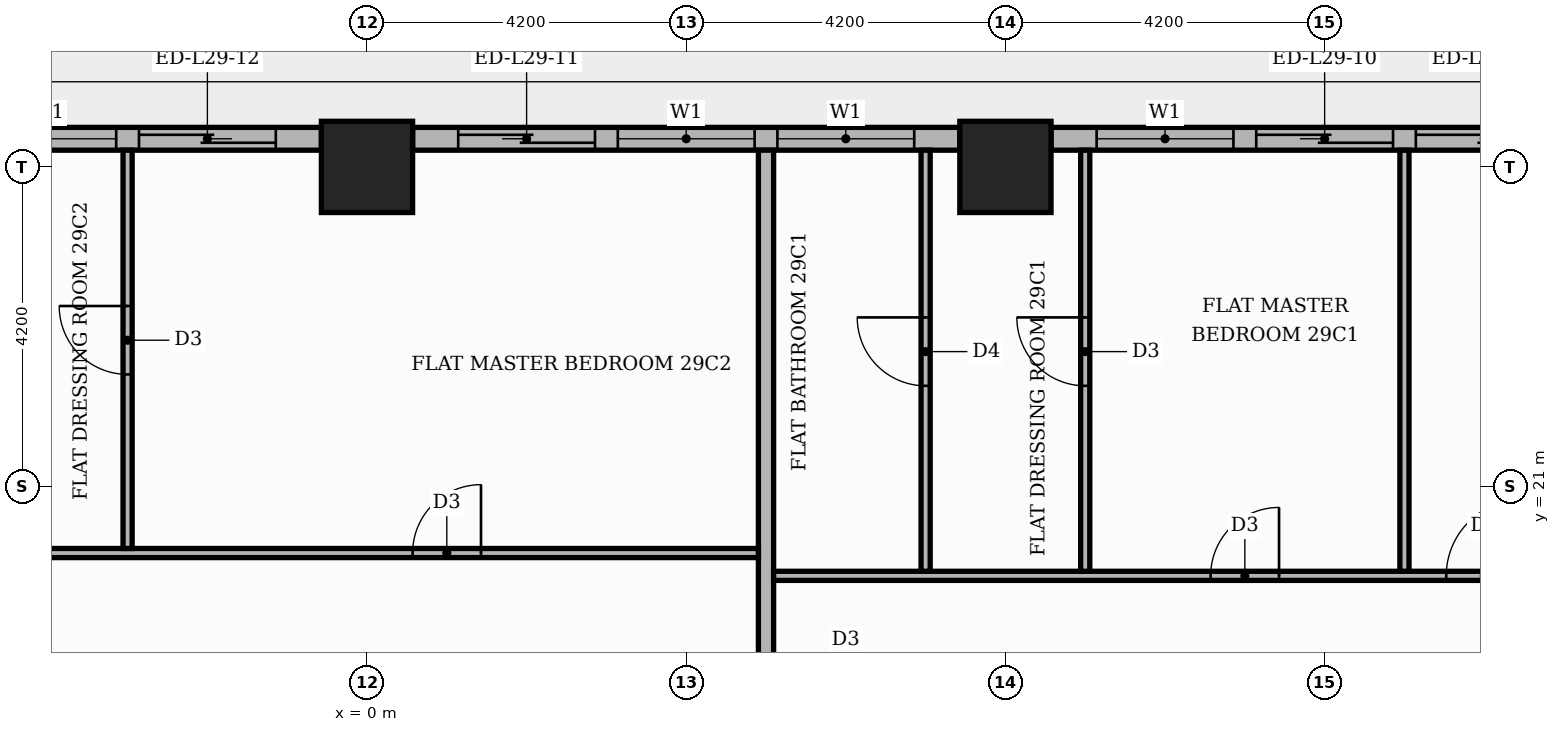
"""IFC4 building model, lengths in metres.
Left out: names, types, materials, properties, quantities, classifications, styles, units other than length and angle.
Written with IfcOpenShell. Run it as: python <this file> out.ifc"""

import sys

from ifc_helpers import new_model, si_unit, direction, frame, frame_2d, origin, origin_2d, place, context, subcontext, project, spatial, rectangle, extrude, element, fill, save


model = new_model("IFC4")
c1 = context("Model", 3, precision=1e-05, world=origin(), true_north=direction((0.0, 1.0)))
c2 = subcontext(c1, "Body", "Model", "MODEL_VIEW")
j1 = project(units=[si_unit("LENGTHUNIT", "METRE"), si_unit("PLANEANGLEUNIT", "RADIAN")], contexts=[c1])
p1 = place(None, origin())
s1 = spatial("IfcSite", under=j1, at=p1, CompositionType="ELEMENT")
p2 = place(p1, origin())
s2 = spatial("IfcBuilding", under=s1, at=p2, CompositionType="ELEMENT")
p3 = place(p2, frame((0.0, 0.0, 122.1)))
s3 = spatial("IfcBuildingStorey", under=s2, at=p3, CompositionType="ELEMENT", Elevation=122.1)
for number, where, z_axis, x_axis in (
    (1, (0.0, 25.2, 0.0), (0.0, 0.0, 1.0), (1.0, 0.0, 0.0)),
    (2, (8.4, 25.2, 0.0), (0.0, 0.0, 1.0), (1.0, 0.0, 0.0)),
):
    element("IfcColumn", number, at=place(p3, frame(where, z_axis=z_axis, x_axis=x_axis)), inside=s3, PredefinedType="COLUMN", context=c2, shape_type="SweptSolid", body=[
        extrude(rectangle(XDim=1.2, YDim=1.2, at=origin_2d()), origin(), (0.0, 0.0, 1.0), 3.9),
    ])
p4 = place(p3, frame((16.2, 25.57, 0.0), z_axis=(0.0, 0.0, 1.0), x_axis=(-1.0, 0.0, 0.0)))
e3 = element("IfcWall", 3, at=p4, inside=s3, PredefinedType="STANDARD", context=c2, shape_type="SweptSolid", body=[
    extrude(rectangle(XDim=7.2, YDim=0.3, at=frame_2d((3.6, 0.0))), origin(), (0.0, 0.0, 1.0), 3.4),
])
p5 = place(p4, frame((0.6, 0.0, 0.0)))
e4 = element("IfcOpeningElement", 4, at=p5, cuts=e3, PredefinedType="OPENING", context=c2, shape_type="SweptSolid", body=[
    extrude(rectangle(XDim=1.8, YDim=2.4, at=frame_2d((0.9, 1.2))), frame((0.0, 0.16, 0.0), z_axis=(0.0, -1.0, 0.0), x_axis=(1.0, 0.0, 0.0)), (0.0, 0.0, 1.0), 0.32),
])
p6 = place(p4, frame((2.7, 0.0, 0.0)))
e5 = element("IfcOpeningElement", 5, at=p6, cuts=e3, PredefinedType="OPENING", context=c2, shape_type="SweptSolid", body=[
    extrude(rectangle(XDim=1.8, YDim=2.4, at=frame_2d((0.9, 1.2))), frame((0.0, 0.16, 0.0), z_axis=(0.0, -1.0, 0.0), x_axis=(1.0, 0.0, 0.0)), (0.0, 0.0, 1.0), 0.32),
])
p7 = place(p4, frame((4.8, 0.0, 0.9)))
e6 = element("IfcOpeningElement", 6, at=p7, cuts=e3, PredefinedType="OPENING", context=c2, shape_type="SweptSolid", body=[
    extrude(rectangle(XDim=1.8, YDim=2.1, at=frame_2d((0.9, 1.05))), frame((0.0, 0.16, 0.0), z_axis=(0.0, -1.0, 0.0), x_axis=(1.0, 0.0, 0.0)), (0.0, 0.0, 1.0), 0.32),
])
p8 = place(p3, frame((7.8, 25.57, 0.0), z_axis=(0.0, 0.0, 1.0), x_axis=(-1.0, 0.0, 0.0)))
e7 = element("IfcWall", 7, at=p8, inside=s3, PredefinedType="STANDARD", context=c2, shape_type="SweptSolid", body=[
    extrude(rectangle(XDim=7.2, YDim=0.3, at=frame_2d((3.6, 0.0))), origin(), (0.0, 0.0, 1.0), 3.4),
])
p9 = place(p8, frame((0.6, 0.0, 0.9)))
e8 = element("IfcOpeningElement", 8, at=p9, cuts=e7, PredefinedType="OPENING", context=c2, shape_type="SweptSolid", body=[
    extrude(rectangle(XDim=1.8, YDim=2.1, at=frame_2d((0.9, 1.05))), frame((0.0, 0.16, 0.0), z_axis=(0.0, -1.0, 0.0), x_axis=(1.0, 0.0, 0.0)), (0.0, 0.0, 1.0), 0.32),
])
p10 = place(p8, frame((2.7, 0.0, 0.9)))
e9 = element("IfcOpeningElement", 9, at=p10, cuts=e7, PredefinedType="OPENING", context=c2, shape_type="SweptSolid", body=[
    extrude(rectangle(XDim=1.8, YDim=2.1, at=frame_2d((0.9, 1.05))), frame((0.0, 0.16, 0.0), z_axis=(0.0, -1.0, 0.0), x_axis=(1.0, 0.0, 0.0)), (0.0, 0.0, 1.0), 0.32),
])
p11 = place(p8, frame((4.8, 0.0, 0.0)))
e10 = element("IfcOpeningElement", 10, at=p11, cuts=e7, PredefinedType="OPENING", context=c2, shape_type="SweptSolid", body=[
    extrude(rectangle(XDim=1.8, YDim=2.4, at=frame_2d((0.9, 1.2))), frame((0.0, 0.16, 0.0), z_axis=(0.0, -1.0, 0.0), x_axis=(1.0, 0.0, 0.0)), (0.0, 0.0, 1.0), 0.32),
])
p12 = place(p3, frame((-0.6, 25.57, 0.0), z_axis=(0.0, 0.0, 1.0), x_axis=(-1.0, 0.0, 0.0)))
e11 = element("IfcWall", 11, at=p12, inside=s3, PredefinedType="STANDARD", context=c2, shape_type="SweptSolid", body=[
    extrude(rectangle(XDim=7.2, YDim=0.3, at=frame_2d((3.6, 0.0))), origin(), (0.0, 0.0, 1.0), 3.4),
])
p13 = place(p12, frame((0.6, 0.0, 0.0)))
e12 = element("IfcOpeningElement", 12, at=p13, cuts=e11, PredefinedType="OPENING", context=c2, shape_type="SweptSolid", body=[
    extrude(rectangle(XDim=1.8, YDim=2.4, at=frame_2d((0.9, 1.2))), frame((0.0, 0.16, 0.0), z_axis=(0.0, -1.0, 0.0), x_axis=(1.0, 0.0, 0.0)), (0.0, 0.0, 1.0), 0.32),
])
p14 = place(p12, frame((2.7, 0.0, 0.9)))
e13 = element("IfcOpeningElement", 13, at=p14, cuts=e11, PredefinedType="OPENING", context=c2, shape_type="SweptSolid", body=[
    extrude(rectangle(XDim=1.8, YDim=2.1, at=frame_2d((0.9, 1.05))), frame((0.0, 0.16, 0.0), z_axis=(0.0, -1.0, 0.0), x_axis=(1.0, 0.0, 0.0)), (0.0, 0.0, 1.0), 0.32),
])
p15 = place(p12, frame((4.8, 0.0, 0.9)))
e14 = element("IfcOpeningElement", 14, at=p15, cuts=e11, PredefinedType="OPENING", context=c2, shape_type="SweptSolid", body=[
    extrude(rectangle(XDim=1.8, YDim=2.1, at=frame_2d((0.9, 1.05))), frame((0.0, 0.16, 0.0), z_axis=(0.0, -1.0, 0.0), x_axis=(1.0, 0.0, 0.0)), (0.0, 0.0, 1.0), 0.32),
])
p16 = place(p3, frame((5.25, 13.75, 0.0), z_axis=(0.0, 0.0, 1.0), x_axis=(0.0, 1.0, 0.0)))
e15 = element("IfcWall", 15, at=p16, inside=s3, PredefinedType="PARTITIONING", context=c2, shape_type="SweptSolid", body=[
    extrude(rectangle(XDim=11.67, YDim=0.2, at=frame_2d((5.835, 0.0))), origin(), (0.0, 0.0, 1.0), 3.4),
])
p17 = place(p3, frame((5.35, 19.82, 0.0), z_axis=(0.0, 0.0, 1.0), x_axis=(1.0, 0.0, 0.0)))
e16 = element("IfcWall", 16, at=p17, inside=s3, PredefinedType="PARTITIONING", context=c2, shape_type="SweptSolid", body=[
    extrude(rectangle(XDim=12.05, YDim=0.12, at=frame_2d((6.025, 0.0))), origin(), (0.0, 0.0, 1.0), 3.4),
])
p18 = place(p17, frame((8.85, 0.0, 0.0)))
e17 = element("IfcOpeningElement", 17, at=p18, cuts=e16, PredefinedType="OPENING", context=c2, shape_type="SweptSolid", body=[
    extrude(rectangle(XDim=1.0, YDim=2.1, at=frame_2d((0.5, 1.05))), frame((0.0, 0.07, 0.0), z_axis=(0.0, -1.0, 0.0), x_axis=(1.0, 0.0, 0.0)), (0.0, 0.0, 1.0), 0.14),
])
p19 = place(p17, frame((5.75, 0.0, 0.0)))
e18 = element("IfcOpeningElement", 18, at=p19, cuts=e16, PredefinedType="OPENING", context=c2, shape_type="SweptSolid", body=[
    extrude(rectangle(XDim=0.9, YDim=2.1, at=frame_2d((0.45, 1.05))), frame((0.0, 0.07, 0.0), z_axis=(0.0, -1.0, 0.0), x_axis=(1.0, 0.0, 0.0)), (0.0, 0.0, 1.0), 0.14),
])
p20 = place(p3, frame((7.35, 19.88, 0.0), z_axis=(0.0, 0.0, 1.0), x_axis=(0.0, 1.0, 0.0)))
e19 = element("IfcWall", 19, at=p20, inside=s3, PredefinedType="PARTITIONING", context=c2, shape_type="SweptSolid", body=[
    extrude(rectangle(XDim=5.54, YDim=0.12, at=frame_2d((2.77, 0.0))), origin(), (0.0, 0.0, 1.0), 3.4),
])
p21 = place(p20, frame((2.44, 0.0, 0.0)))
e20 = element("IfcOpeningElement", 20, at=p21, cuts=e19, PredefinedType="OPENING", context=c2, shape_type="SweptSolid", body=[
    extrude(rectangle(XDim=0.9, YDim=2.1, at=frame_2d((0.45, 1.05))), frame((0.0, 0.07, 0.0), z_axis=(0.0, -1.0, 0.0), x_axis=(1.0, 0.0, 0.0)), (0.0, 0.0, 1.0), 0.14),
])
p22 = place(p3, frame((9.45, 19.88, 0.0), z_axis=(0.0, 0.0, 1.0), x_axis=(0.0, 1.0, 0.0)))
e21 = element("IfcWall", 21, at=p22, inside=s3, PredefinedType="PARTITIONING", context=c2, shape_type="SweptSolid", body=[
    extrude(rectangle(XDim=5.54, YDim=0.12, at=frame_2d((2.77, 0.0))), origin(), (0.0, 0.0, 1.0), 3.4),
])
p23 = place(p22, frame((2.44, 0.0, 0.0)))
e22 = element("IfcOpeningElement", 22, at=p23, cuts=e21, PredefinedType="OPENING", context=c2, shape_type="SweptSolid", body=[
    extrude(rectangle(XDim=0.9, YDim=2.1, at=frame_2d((0.45, 1.05))), frame((0.0, 0.07, 0.0), z_axis=(0.0, -1.0, 0.0), x_axis=(1.0, 0.0, 0.0)), (0.0, 0.0, 1.0), 0.14),
])
p24 = place(p3, frame((13.65, 19.88, 0.0), z_axis=(0.0, 0.0, 1.0), x_axis=(0.0, 1.0, 0.0)))
e23 = element("IfcWall", 23, at=p24, inside=s3, PredefinedType="PARTITIONING", context=c2, shape_type="SweptSolid", body=[
    extrude(rectangle(XDim=5.54, YDim=0.12, at=frame_2d((2.77, 0.0))), origin(), (0.0, 0.0, 1.0), 3.4),
])
p25 = place(p3, frame((-13.55, 20.12, 0.0), z_axis=(0.0, 0.0, 1.0), x_axis=(1.0, 0.0, 0.0)))
e24 = element("IfcWall", 24, at=p25, inside=s3, PredefinedType="PARTITIONING", context=c2, shape_type="SweptSolid", body=[
    extrude(rectangle(XDim=18.7, YDim=0.12, at=frame_2d((9.35, 0.0))), origin(), (0.0, 0.0, 1.0), 3.4),
])
p26 = place(p25, frame((14.15, 0.0, 0.0)))
e25 = element("IfcOpeningElement", 25, at=p26, cuts=e24, PredefinedType="OPENING", context=c2, shape_type="SweptSolid", body=[
    extrude(rectangle(XDim=0.9, YDim=2.1, at=frame_2d((0.45, 1.05))), frame((0.0, 0.07, 0.0), z_axis=(0.0, -1.0, 0.0), x_axis=(1.0, 0.0, 0.0)), (0.0, 0.0, 1.0), 0.14),
])
p27 = place(p25, frame((2.55, 0.0, 0.0)))
e26 = element("IfcOpeningElement", 26, at=p27, cuts=e24, PredefinedType="OPENING", context=c2, shape_type="SweptSolid", body=[
    extrude(rectangle(XDim=1.0, YDim=2.1, at=frame_2d((0.5, 1.05))), frame((0.0, 0.07, 0.0), z_axis=(0.0, -1.0, 0.0), x_axis=(1.0, 0.0, 0.0)), (0.0, 0.0, 1.0), 0.14),
])
p28 = place(p3, frame((-3.15, 20.18, 0.0), z_axis=(0.0, 0.0, 1.0), x_axis=(0.0, 1.0, 0.0)))
e27 = element("IfcWall", 27, at=p28, inside=s3, PredefinedType="PARTITIONING", context=c2, shape_type="SweptSolid", body=[
    extrude(rectangle(XDim=5.24, YDim=0.12, at=frame_2d((2.62, 0.0))), origin(), (0.0, 0.0, 1.0), 3.4),
])
p29 = place(p28, frame((2.29, 0.0, 0.0)))
e28 = element("IfcOpeningElement", 28, at=p29, cuts=e27, PredefinedType="OPENING", context=c2, shape_type="SweptSolid", body=[
    extrude(rectangle(XDim=0.9, YDim=2.1, at=frame_2d((0.45, 1.05))), frame((0.0, 0.07, 0.0), z_axis=(0.0, -1.0, 0.0), x_axis=(1.0, 0.0, 0.0)), (0.0, 0.0, 1.0), 0.14),
])
p30 = place(p5, origin())
e29 = element("IfcDoor", 29, at=p30, inside=s3, OperationType="SLIDING_TO_LEFT", PredefinedType="DOOR", context=c2, shape_type="SweptSolid", body=[
    extrude(rectangle(XDim=1.8, YDim=2.4, at=frame_2d((0.9, 1.2))), frame((0.0, 0.025, 0.0), z_axis=(0.0, -1.0, 0.0), x_axis=(1.0, 0.0, 0.0)), (0.0, 0.0, 1.0), 0.05),
])
fill(e4, e29)
p31 = place(p6, origin())
e30 = element("IfcDoor", 30, at=p31, inside=s3, OperationType="SLIDING_TO_RIGHT", PredefinedType="DOOR", context=c2, shape_type="SweptSolid", body=[
    extrude(rectangle(XDim=1.8, YDim=2.4, at=frame_2d((0.9, 1.2))), frame((0.0, 0.025, 0.0), z_axis=(0.0, -1.0, 0.0), x_axis=(1.0, 0.0, 0.0)), (0.0, 0.0, 1.0), 0.05),
])
fill(e5, e30)
p32 = place(p7, origin())
e31 = element("IfcWindow", 31, at=p32, inside=s3, PartitioningType="SINGLE_PANEL", PredefinedType="WINDOW", context=c2, shape_type="SweptSolid", body=[
    extrude(rectangle(XDim=1.8, YDim=2.1, at=frame_2d((0.9, 1.05))), frame((0.0, 0.03, 0.0), z_axis=(0.0, -1.0, 0.0), x_axis=(1.0, 0.0, 0.0)), (0.0, 0.0, 1.0), 0.06),
])
fill(e6, e31)
p33 = place(p9, origin())
e32 = element("IfcWindow", 32, at=p33, inside=s3, PartitioningType="SINGLE_PANEL", PredefinedType="WINDOW", context=c2, shape_type="SweptSolid", body=[
    extrude(rectangle(XDim=1.8, YDim=2.1, at=frame_2d((0.9, 1.05))), frame((0.0, 0.03, 0.0), z_axis=(0.0, -1.0, 0.0), x_axis=(1.0, 0.0, 0.0)), (0.0, 0.0, 1.0), 0.06),
])
fill(e8, e32)
p34 = place(p10, origin())
e33 = element("IfcWindow", 33, at=p34, inside=s3, PartitioningType="SINGLE_PANEL", PredefinedType="WINDOW", context=c2, shape_type="SweptSolid", body=[
    extrude(rectangle(XDim=1.8, YDim=2.1, at=frame_2d((0.9, 1.05))), frame((0.0, 0.03, 0.0), z_axis=(0.0, -1.0, 0.0), x_axis=(1.0, 0.0, 0.0)), (0.0, 0.0, 1.0), 0.06),
])
fill(e9, e33)
p35 = place(p11, origin())
e34 = element("IfcDoor", 34, at=p35, inside=s3, OperationType="SLIDING_TO_RIGHT", PredefinedType="DOOR", context=c2, shape_type="SweptSolid", body=[
    extrude(rectangle(XDim=1.8, YDim=2.4, at=frame_2d((0.9, 1.2))), frame((0.0, 0.025, 0.0), z_axis=(0.0, -1.0, 0.0), x_axis=(1.0, 0.0, 0.0)), (0.0, 0.0, 1.0), 0.05),
])
fill(e10, e34)
p36 = place(p13, origin())
e35 = element("IfcDoor", 35, at=p36, inside=s3, OperationType="SLIDING_TO_LEFT", PredefinedType="DOOR", context=c2, shape_type="SweptSolid", body=[
    extrude(rectangle(XDim=1.8, YDim=2.4, at=frame_2d((0.9, 1.2))), frame((0.0, 0.025, 0.0), z_axis=(0.0, -1.0, 0.0), x_axis=(1.0, 0.0, 0.0)), (0.0, 0.0, 1.0), 0.05),
])
fill(e12, e35)
p37 = place(p14, origin())
e36 = element("IfcWindow", 36, at=p37, inside=s3, PartitioningType="SINGLE_PANEL", PredefinedType="WINDOW", context=c2, shape_type="SweptSolid", body=[
    extrude(rectangle(XDim=1.8, YDim=2.1, at=frame_2d((0.9, 1.05))), frame((0.0, 0.03, 0.0), z_axis=(0.0, -1.0, 0.0), x_axis=(1.0, 0.0, 0.0)), (0.0, 0.0, 1.0), 0.06),
])
fill(e13, e36)
p38 = place(p18, origin())
e37 = element("IfcDoor", 37, at=p38, inside=s3, OperationType="SINGLE_SWING_RIGHT", PredefinedType="DOOR", context=c2, shape_type="SweptSolid", body=[
    extrude(rectangle(XDim=1.0, YDim=2.1, at=frame_2d((0.5, 1.05))), frame((0.0, 0.025, 0.0), z_axis=(0.0, -1.0, 0.0), x_axis=(1.0, 0.0, 0.0)), (0.0, 0.0, 1.0), 0.05),
])
fill(e17, e37)
p39 = place(p19, origin())
e38 = element("IfcDoor", 38, at=p39, inside=s3, OperationType="SINGLE_SWING_RIGHT", PredefinedType="DOOR", context=c2, shape_type="SweptSolid", body=[
    extrude(rectangle(XDim=0.9, YDim=2.1, at=frame_2d((0.45, 1.05))), frame((0.0, 0.025, 0.0), z_axis=(0.0, -1.0, 0.0), x_axis=(1.0, 0.0, 0.0)), (0.0, 0.0, 1.0), 0.05),
])
fill(e18, e38)
p40 = place(p23, origin())
e39 = element("IfcDoor", 39, at=p40, inside=s3, OperationType="SINGLE_SWING_RIGHT", PredefinedType="DOOR", context=c2, shape_type="SweptSolid", body=[
    extrude(rectangle(XDim=0.9, YDim=2.1, at=frame_2d((0.45, 1.05))), frame((0.0, 0.025, 0.0), z_axis=(0.0, -1.0, 0.0), x_axis=(1.0, 0.0, 0.0)), (0.0, 0.0, 1.0), 0.05),
])
fill(e22, e39)
p41 = place(p21, origin())
e40 = element("IfcDoor", 40, at=p41, inside=s3, OperationType="SINGLE_SWING_RIGHT", PredefinedType="DOOR", context=c2, shape_type="SweptSolid", body=[
    extrude(rectangle(XDim=0.9, YDim=2.1, at=frame_2d((0.45, 1.05))), frame((0.0, 0.025, 0.0), z_axis=(0.0, -1.0, 0.0), x_axis=(1.0, 0.0, 0.0)), (0.0, 0.0, 1.0), 0.05),
])
fill(e20, e40)
p42 = place(p26, origin())
e41 = element("IfcDoor", 41, at=p42, inside=s3, OperationType="SINGLE_SWING_RIGHT", PredefinedType="DOOR", context=c2, shape_type="SweptSolid", body=[
    extrude(rectangle(XDim=0.9, YDim=2.1, at=frame_2d((0.45, 1.05))), frame((0.0, 0.025, 0.0), z_axis=(0.0, -1.0, 0.0), x_axis=(1.0, 0.0, 0.0)), (0.0, 0.0, 1.0), 0.05),
])
fill(e25, e41)
p43 = place(p29, origin())
e42 = element("IfcDoor", 42, at=p43, inside=s3, OperationType="SINGLE_SWING_RIGHT", PredefinedType="DOOR", context=c2, shape_type="SweptSolid", body=[
    extrude(rectangle(XDim=0.9, YDim=2.1, at=frame_2d((0.45, 1.05))), frame((0.0, 0.025, 0.0), z_axis=(0.0, -1.0, 0.0), x_axis=(1.0, 0.0, 0.0)), (0.0, 0.0, 1.0), 0.05),
])
fill(e28, e42)
save(model, sys.argv[1])
